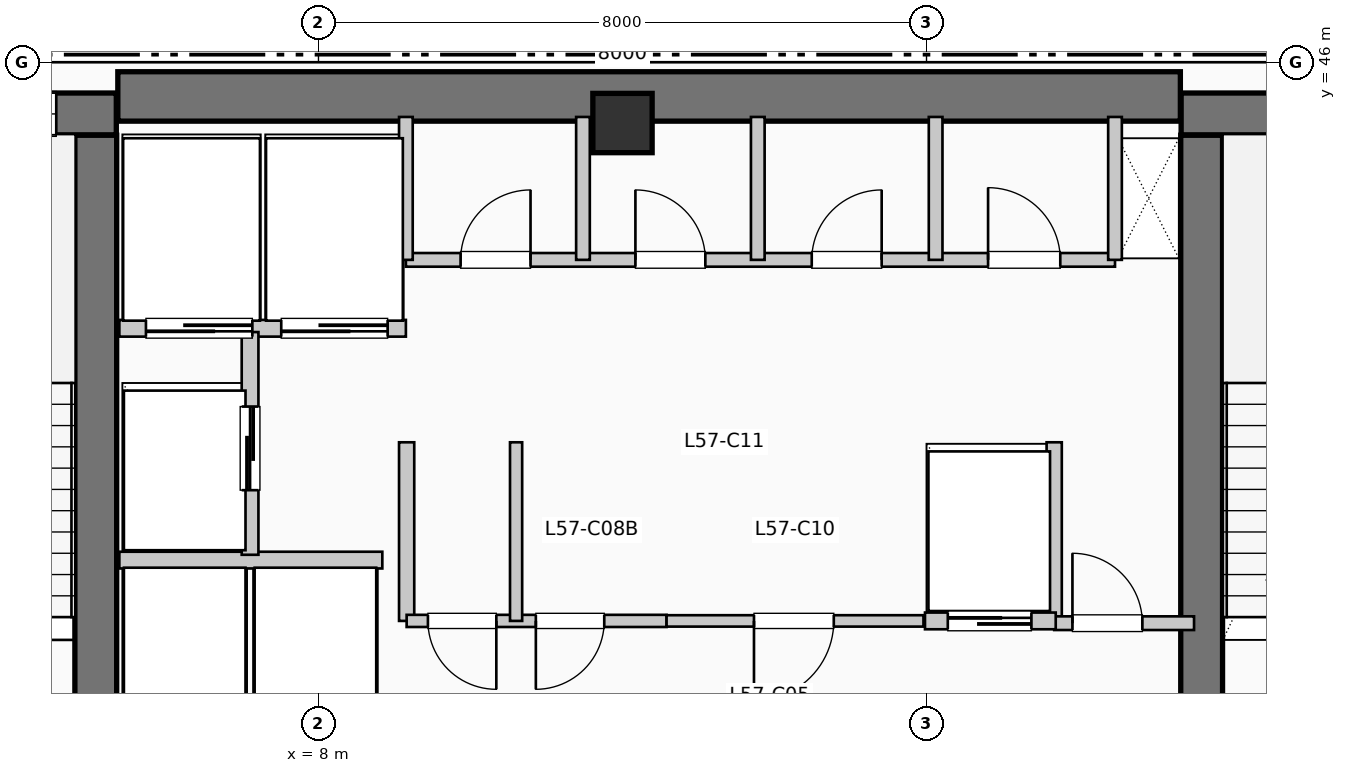
"""IFC4 building model, lengths in metres.
Left out: names, types, materials, properties, quantities, classifications, styles, units other than length and angle.
Written with IfcOpenShell. Run it as: python <this file> out.ifc"""

import sys

from ifc_helpers import new_model, si_unit, direction, frame, frame_2d, origin, origin_2d, place, context, subcontext, project, spatial, rectangle, extrude, element, fill, save


model = new_model("IFC4")
c1 = context("Model", 3, precision=1e-05, world=origin(), true_north=direction((0.0, 1.0)))
c2 = subcontext(c1, "Body", "Model", "MODEL_VIEW")
j1 = project(units=[si_unit("LENGTHUNIT", "METRE"), si_unit("PLANEANGLEUNIT", "RADIAN")], contexts=[c1])
p1 = place(None, origin())
s1 = spatial("IfcSite", under=j1, at=p1, CompositionType="ELEMENT")
p2 = place(p1, origin())
s2 = spatial("IfcBuilding", under=s1, at=p2, CompositionType="ELEMENT")
p3 = place(p2, frame((0.0, 0.0, 235.62)))
s3 = spatial("IfcBuildingStorey", under=s2, at=p3, CompositionType="ELEMENT", Elevation=235.62)
p4 = place(p3, frame((5.36, 45.55, 0.0), z_axis=(0.0, 0.0, 1.0), x_axis=(1.0, 0.0, 0.0)))
e1 = element("IfcWall", 1, at=p4, inside=s3, PredefinedType="SHEAR", context=c2, shape_type="SweptSolid", body=[
    extrude(rectangle(XDim=13.98, YDim=0.65, at=frame_2d((6.99, 0.0))), origin(), (0.0, 0.0, 1.0), 3.96),
])
p5 = place(p3, frame((5.07, 37.15, 0.0), z_axis=(0.0, 0.0, 1.0), x_axis=(0.0, 1.0, 0.0)))
e2 = element("IfcWall", 2, at=p5, inside=s3, PredefinedType="SHEAR", context=c2, shape_type="SweptSolid", body=[
    extrude(rectangle(XDim=7.89, YDim=0.55, at=frame_2d((3.945, 0.0))), origin(), (0.0, 0.0, 1.0), 3.96),
])
p6 = place(p3, frame((1.1, 45.32, 0.0), z_axis=(0.0, 0.0, 1.0), x_axis=(1.0, 0.0, 0.0)))
e3 = element("IfcWall", 3, at=p6, inside=s3, PredefinedType="SHEAR", context=c2, shape_type="SweptSolid", body=[
    extrude(rectangle(XDim=4.24, YDim=0.55, at=frame_2d((2.12, 0.0))), origin(), (0.0, 0.0, 1.0), 3.96),
])
p7 = place(p6, frame((2.05, 0.0, 1.05)))
e4 = element("IfcOpeningElement", 4, at=p7, cuts=e3, PredefinedType="OPENING", context=c2, shape_type="SweptSolid", body=[
    extrude(rectangle(XDim=1.4, YDim=1.8, at=frame_2d((0.7, 0.9))), frame((0.0, 0.285, 0.0), z_axis=(0.0, -1.0, 0.0), x_axis=(1.0, 0.0, 0.0)), (0.0, 0.0, 1.0), 0.57),
])
p8 = place(p3, frame((19.62, 37.15, 0.0), z_axis=(0.0, 0.0, 1.0), x_axis=(0.0, 1.0, 0.0)))
e5 = element("IfcWall", 5, at=p8, inside=s3, PredefinedType="SHEAR", context=c2, shape_type="SweptSolid", body=[
    extrude(rectangle(XDim=7.89, YDim=0.55, at=frame_2d((3.945, 0.0))), origin(), (0.0, 0.0, 1.0), 3.96),
])
p9 = place(p3, frame((19.35, 45.32, 0.0), z_axis=(0.0, 0.0, 1.0), x_axis=(1.0, 0.0, 0.0)))
e6 = element("IfcWall", 6, at=p9, inside=s3, PredefinedType="SHEAR", context=c2, shape_type="SweptSolid", body=[
    extrude(rectangle(XDim=3.69, YDim=0.55, at=frame_2d((1.845, 0.0))), origin(), (0.0, 0.0, 1.0), 3.96),
])
p10 = place(p9, frame((1.15, 0.0, 1.05)))
e7 = element("IfcOpeningElement", 7, at=p10, cuts=e6, PredefinedType="OPENING", context=c2, shape_type="SweptSolid", body=[
    extrude(rectangle(XDim=1.4, YDim=1.8, at=frame_2d((0.7, 0.9))), frame((0.0, 0.285, 0.0), z_axis=(0.0, -1.0, 0.0), x_axis=(1.0, 0.0, 0.0)), (0.0, 0.0, 1.0), 0.57),
])
p11 = place(p3, frame((12.0, 45.2, 0.0), z_axis=(0.0, 0.0, 1.0), x_axis=(1.0, 0.0, 0.0)))
e8 = element("IfcColumn", 8, at=p11, inside=s3, PredefinedType="COLUMN", context=c2, shape_type="SweptSolid", body=[
    extrude(rectangle(XDim=0.78, YDim=0.78, at=origin_2d()), origin(), (0.0, 0.0, 1.0), 3.96),
])
p12 = place(p3, frame((5.38, 39.45, 0.0), z_axis=(0.0, 0.0, 1.0), x_axis=(1.0, 0.0, 0.0)))
e9 = element("IfcWall", 9, at=p12, inside=s3, PredefinedType="PARTITIONING", context=c2, shape_type="SweptSolid", body=[
    extrude(rectangle(XDim=3.46, YDim=0.22, at=frame_2d((1.73, 0.0))), origin(), (0.0, 0.0, 1.0), 3.71),
])
p13 = place(p3, frame((5.38, 42.5, 0.0), z_axis=(0.0, 0.0, 1.0), x_axis=(1.0, 0.0, 0.0)))
e10 = element("IfcWall", 10, at=p13, inside=s3, PredefinedType="PARTITIONING", context=c2, shape_type="SweptSolid", body=[
    extrude(rectangle(XDim=3.77, YDim=0.22, at=frame_2d((1.885, 0.0))), origin(), (0.0, 0.0, 1.0), 3.71),
])
p14 = place(p13, frame((1.75, 0.0, 0.0), z_axis=(0.0, 0.0, 1.0), x_axis=(-1.0, 0.0, 0.0)))
e11 = element("IfcOpeningElement", 11, at=p14, cuts=e10, PredefinedType="OPENING", context=c2, shape_type="SweptSolid", body=[
    extrude(rectangle(XDim=1.4, YDim=2.2, at=frame_2d((0.7, 1.1))), frame((0.0, 0.12, 0.0), z_axis=(0.0, -1.0, 0.0), x_axis=(1.0, 0.0, 0.0)), (0.0, 0.0, 1.0), 0.24),
])
p15 = place(p13, frame((3.53, 0.0, 0.0), z_axis=(0.0, 0.0, 1.0), x_axis=(-1.0, 0.0, 0.0)))
e12 = element("IfcOpeningElement", 12, at=p15, cuts=e10, PredefinedType="OPENING", context=c2, shape_type="SweptSolid", body=[
    extrude(rectangle(XDim=1.4, YDim=2.2, at=frame_2d((0.7, 1.1))), frame((0.0, 0.12, 0.0), z_axis=(0.0, -1.0, 0.0), x_axis=(1.0, 0.0, 0.0)), (0.0, 0.0, 1.0), 0.24),
])
p16 = place(p3, frame((7.1, 39.52, 0.0), z_axis=(0.0, 0.0, 1.0), x_axis=(0.0, 1.0, 0.0)))
e13 = element("IfcWall", 13, at=p16, inside=s3, PredefinedType="PARTITIONING", context=c2, shape_type="SweptSolid", body=[
    extrude(rectangle(XDim=2.93, YDim=0.22, at=frame_2d((1.465, 0.0))), origin(), (0.0, 0.0, 1.0), 3.71),
])
p17 = place(p16, frame((0.85, 0.0, 0.0)))
e14 = element("IfcOpeningElement", 14, at=p17, cuts=e13, PredefinedType="OPENING", context=c2, shape_type="SweptSolid", body=[
    extrude(rectangle(XDim=1.1, YDim=2.2, at=frame_2d((0.55, 1.1))), frame((0.0, 0.12, 0.0), z_axis=(0.0, -1.0, 0.0), x_axis=(1.0, 0.0, 0.0)), (0.0, 0.0, 1.0), 0.24),
])
for number, where, z_axis, x_axis in (
    (15, (9.16, 38.65, 0.0), (0.0, 0.0, 1.0), (0.0, 1.0, 0.0)),
    (16, (17.68, 38.65, 0.0), (0.0, 0.0, 1.0), (0.0, 1.0, 0.0)),
):
    element("IfcWall", number, at=place(p3, frame(where, z_axis=z_axis, x_axis=x_axis)), inside=s3, PredefinedType="PARTITIONING", context=c2, shape_type="SweptSolid", body=[
        extrude(rectangle(XDim=2.35, YDim=0.2, at=frame_2d((1.175, 0.0))), origin(), (0.0, 0.0, 1.0), 3.71),
    ])
p18 = place(p3, frame((17.68, 38.62, 0.0), z_axis=(0.0, 0.0, 1.0), x_axis=(1.0, 0.0, 0.0)))
e17 = element("IfcWall", 17, at=p18, inside=s3, PredefinedType="PARTITIONING", context=c2, shape_type="SweptSolid", body=[
    extrude(rectangle(XDim=1.84, YDim=0.18, at=frame_2d((0.92, 0.0))), origin(), (0.0, 0.0, 1.0), 3.71),
])
p19 = place(p18, frame((0.24, 0.0, 0.0)))
e18 = element("IfcOpeningElement", 18, at=p19, cuts=e17, PredefinedType="OPENING", context=c2, shape_type="SweptSolid", body=[
    extrude(rectangle(XDim=0.92, YDim=2.1, at=frame_2d((0.46, 1.05))), frame((0.0, 0.1, 0.0), z_axis=(0.0, -1.0, 0.0), x_axis=(1.0, 0.0, 0.0)), (0.0, 0.0, 1.0), 0.2),
])
p20 = place(p3, frame((9.16, 38.65, 0.0), z_axis=(0.0, 0.0, 1.0), x_axis=(1.0, 0.0, 0.0)))
e19 = element("IfcWall", 19, at=p20, inside=s3, PredefinedType="PARTITIONING", context=c2, shape_type="SweptSolid", body=[
    extrude(rectangle(XDim=3.42, YDim=0.16, at=frame_2d((1.71, 0.0))), origin(), (0.0, 0.0, 1.0), 3.71),
])
p21 = place(p20, frame((1.18, 0.0, 0.0), z_axis=(0.0, 0.0, 1.0), x_axis=(-1.0, 0.0, 0.0)))
e20 = element("IfcOpeningElement", 20, at=p21, cuts=e19, PredefinedType="OPENING", context=c2, shape_type="SweptSolid", body=[
    extrude(rectangle(XDim=0.9, YDim=2.15, at=frame_2d((0.45, 1.075))), frame((0.0, 0.09, 0.0), z_axis=(0.0, -1.0, 0.0), x_axis=(1.0, 0.0, 0.0)), (0.0, 0.0, 1.0), 0.18),
])
p22 = place(p20, frame((2.6, 0.0, 0.0), z_axis=(0.0, 0.0, 1.0), x_axis=(-1.0, 0.0, 0.0)))
e21 = element("IfcOpeningElement", 21, at=p22, cuts=e19, PredefinedType="OPENING", context=c2, shape_type="SweptSolid", body=[
    extrude(rectangle(XDim=0.9, YDim=2.15, at=frame_2d((0.45, 1.075))), frame((0.0, 0.09, 0.0), z_axis=(0.0, -1.0, 0.0), x_axis=(1.0, 0.0, 0.0)), (0.0, 0.0, 1.0), 0.18),
])
p23 = place(p3, frame((10.6, 38.65, 0.0), z_axis=(0.0, 0.0, 1.0), x_axis=(0.0, 1.0, 0.0)))
e22 = element("IfcWall", 22, at=p23, inside=s3, PredefinedType="PARTITIONING", context=c2, shape_type="SweptSolid", body=[
    extrude(rectangle(XDim=2.35, YDim=0.16, at=frame_2d((1.175, 0.0))), origin(), (0.0, 0.0, 1.0), 3.71),
])
p24 = place(p3, frame((12.58, 38.65, 0.0), z_axis=(0.0, 0.0, 1.0), x_axis=(1.0, 0.0, 0.0)))
e23 = element("IfcWall", 23, at=p24, inside=s3, PredefinedType="PARTITIONING", context=c2, shape_type="SweptSolid", body=[
    extrude(rectangle(XDim=3.38, YDim=0.15, at=frame_2d((1.69, 0.0))), origin(), (0.0, 0.0, 1.0), 3.71),
])
p25 = place(p24, frame((2.2, 0.0, 0.0), z_axis=(0.0, 0.0, 1.0), x_axis=(-1.0, 0.0, 0.0)))
e24 = element("IfcOpeningElement", 24, at=p25, cuts=e23, PredefinedType="OPENING", context=c2, shape_type="SweptSolid", body=[
    extrude(rectangle(XDim=1.05, YDim=2.15, at=frame_2d((0.525, 1.075))), frame((0.0, 0.085, 0.0), z_axis=(0.0, -1.0, 0.0), x_axis=(1.0, 0.0, 0.0)), (0.0, 0.0, 1.0), 0.17),
])
p26 = place(p3, frame((15.98, 38.65, 0.0), z_axis=(0.0, 0.0, 1.0), x_axis=(1.0, 0.0, 0.0)))
e25 = element("IfcWall", 25, at=p26, inside=s3, PredefinedType="PARTITIONING", context=c2, shape_type="SweptSolid", body=[
    extrude(rectangle(XDim=1.72, YDim=0.22, at=frame_2d((0.86, 0.0))), origin(), (0.0, 0.0, 1.0), 3.71),
])
p27 = place(p26, frame((0.3, 0.0, 0.0)))
e26 = element("IfcOpeningElement", 26, at=p27, cuts=e25, PredefinedType="OPENING", context=c2, shape_type="SweptSolid", body=[
    extrude(rectangle(XDim=1.1, YDim=2.2, at=frame_2d((0.55, 1.1))), frame((0.0, 0.12, 0.0), z_axis=(0.0, -1.0, 0.0), x_axis=(1.0, 0.0, 0.0)), (0.0, 0.0, 1.0), 0.24),
])
p28 = place(p3, frame((9.15, 43.4, 0.0), z_axis=(0.0, 0.0, 1.0), x_axis=(1.0, 0.0, 0.0)))
e27 = element("IfcWall", 27, at=p28, inside=s3, PredefinedType="PLUMBINGWALL", context=c2, shape_type="SweptSolid", body=[
    extrude(rectangle(XDim=9.33, YDim=0.18, at=frame_2d((4.665, 0.0))), origin(), (0.0, 0.0, 1.0), 3.71),
])
p29 = place(p28, frame((0.72, 0.0, 0.0)))
e28 = element("IfcOpeningElement", 28, at=p29, cuts=e27, PredefinedType="OPENING", context=c2, shape_type="SweptSolid", body=[
    extrude(rectangle(XDim=0.92, YDim=2.1, at=frame_2d((0.46, 1.05))), frame((0.0, 0.1, 0.0), z_axis=(0.0, -1.0, 0.0), x_axis=(1.0, 0.0, 0.0)), (0.0, 0.0, 1.0), 0.2),
])
p30 = place(p28, frame((3.02, 0.0, 0.0)))
e29 = element("IfcOpeningElement", 29, at=p30, cuts=e27, PredefinedType="OPENING", context=c2, shape_type="SweptSolid", body=[
    extrude(rectangle(XDim=0.92, YDim=2.1, at=frame_2d((0.46, 1.05))), frame((0.0, 0.1, 0.0), z_axis=(0.0, -1.0, 0.0), x_axis=(1.0, 0.0, 0.0)), (0.0, 0.0, 1.0), 0.2),
])
p31 = place(p28, frame((5.34, 0.0, 0.0)))
e30 = element("IfcOpeningElement", 30, at=p31, cuts=e27, PredefinedType="OPENING", context=c2, shape_type="SweptSolid", body=[
    extrude(rectangle(XDim=0.92, YDim=2.1, at=frame_2d((0.46, 1.05))), frame((0.0, 0.1, 0.0), z_axis=(0.0, -1.0, 0.0), x_axis=(1.0, 0.0, 0.0)), (0.0, 0.0, 1.0), 0.2),
])
p32 = place(p28, frame((7.66, 0.0, 0.0)))
e31 = element("IfcOpeningElement", 31, at=p32, cuts=e27, PredefinedType="OPENING", context=c2, shape_type="SweptSolid", body=[
    extrude(rectangle(XDim=0.95, YDim=2.1, at=frame_2d((0.475, 1.05))), frame((0.0, 0.1, 0.0), z_axis=(0.0, -1.0, 0.0), x_axis=(1.0, 0.0, 0.0)), (0.0, 0.0, 1.0), 0.2),
])
for number, where, z_axis, x_axis in (
    (32, (9.15, 43.4, 0.0), (0.0, 0.0, 1.0), (0.0, 1.0, 0.0)),
    (33, (18.48, 43.4, 0.0), (0.0, 0.0, 1.0), (0.0, 1.0, 0.0)),
    (34, (11.48, 43.4, 0.0), (0.0, 0.0, 1.0), (0.0, 1.0, 0.0)),
    (35, (13.78, 43.4, 0.0), (0.0, 0.0, 1.0), (0.0, 1.0, 0.0)),
    (36, (16.12, 43.4, 0.0), (0.0, 0.0, 1.0), (0.0, 1.0, 0.0)),
):
    element("IfcWall", number, at=place(p3, frame(where, z_axis=z_axis, x_axis=x_axis)), inside=s3, PredefinedType="PLUMBINGWALL", context=c2, shape_type="SweptSolid", body=[
        extrude(rectangle(XDim=1.88, YDim=0.18, at=frame_2d((0.94, 0.0))), origin(), (0.0, 0.0, 1.0), 3.71),
    ])
p33 = place(p7, origin())
e37 = element("IfcWindow", 37, at=p33, inside=s3, PartitioningType="SINGLE_PANEL", PredefinedType="WINDOW", context=c2, shape_type="SweptSolid", body=[
    extrude(rectangle(XDim=1.4, YDim=1.8, at=frame_2d((0.7, 0.9))), frame((0.0, 0.03, 0.0), z_axis=(0.0, -1.0, 0.0), x_axis=(1.0, 0.0, 0.0)), (0.0, 0.0, 1.0), 0.06),
])
fill(e4, e37)
p34 = place(p14, origin())
e38 = element("IfcDoor", 38, at=p34, inside=s3, OperationType="SLIDING_TO_LEFT", PredefinedType="DOOR", context=c2, shape_type="SweptSolid", body=[
    extrude(rectangle(XDim=1.4, YDim=2.2, at=frame_2d((0.7, 1.1))), frame((0.0, 0.025, 0.0), z_axis=(0.0, -1.0, 0.0), x_axis=(1.0, 0.0, 0.0)), (0.0, 0.0, 1.0), 0.05),
])
fill(e11, e38)
p35 = place(p15, origin())
e39 = element("IfcDoor", 39, at=p35, inside=s3, OperationType="SLIDING_TO_LEFT", PredefinedType="DOOR", context=c2, shape_type="SweptSolid", body=[
    extrude(rectangle(XDim=1.4, YDim=2.2, at=frame_2d((0.7, 1.1))), frame((0.0, 0.025, 0.0), z_axis=(0.0, -1.0, 0.0), x_axis=(1.0, 0.0, 0.0)), (0.0, 0.0, 1.0), 0.05),
])
fill(e12, e39)
p36 = place(p17, origin())
e40 = element("IfcDoor", 40, at=p36, inside=s3, OperationType="SLIDING_TO_LEFT", PredefinedType="DOOR", context=c2, shape_type="SweptSolid", body=[
    extrude(rectangle(XDim=1.1, YDim=2.2, at=frame_2d((0.55, 1.1))), frame((0.0, 0.025, 0.0), z_axis=(0.0, -1.0, 0.0), x_axis=(1.0, 0.0, 0.0)), (0.0, 0.0, 1.0), 0.05),
])
fill(e14, e40)
p37 = place(p19, origin())
e41 = element("IfcDoor", 41, at=p37, inside=s3, OperationType="SINGLE_SWING_LEFT", PredefinedType="DOOR", context=c2, shape_type="SweptSolid", body=[
    extrude(rectangle(XDim=0.92, YDim=2.1, at=frame_2d((0.46, 1.05))), frame((0.0, 0.025, 0.0), z_axis=(0.0, -1.0, 0.0), x_axis=(1.0, 0.0, 0.0)), (0.0, 0.0, 1.0), 0.05),
])
fill(e18, e41)
p38 = place(p21, origin())
e42 = element("IfcDoor", 42, at=p38, inside=s3, OperationType="SINGLE_SWING_RIGHT", PredefinedType="DOOR", context=c2, shape_type="SweptSolid", body=[
    extrude(rectangle(XDim=0.9, YDim=2.15, at=frame_2d((0.45, 1.075))), frame((0.0, 0.025, 0.0), z_axis=(0.0, -1.0, 0.0), x_axis=(1.0, 0.0, 0.0)), (0.0, 0.0, 1.0), 0.05),
])
fill(e20, e42)
p39 = place(p22, origin())
e43 = element("IfcDoor", 43, at=p39, inside=s3, OperationType="SINGLE_SWING_LEFT", PredefinedType="DOOR", context=c2, shape_type="SweptSolid", body=[
    extrude(rectangle(XDim=0.9, YDim=2.15, at=frame_2d((0.45, 1.075))), frame((0.0, 0.025, 0.0), z_axis=(0.0, -1.0, 0.0), x_axis=(1.0, 0.0, 0.0)), (0.0, 0.0, 1.0), 0.05),
])
fill(e21, e43)
p40 = place(p25, origin())
e44 = element("IfcDoor", 44, at=p40, inside=s3, OperationType="SINGLE_SWING_LEFT", PredefinedType="DOOR", context=c2, shape_type="SweptSolid", body=[
    extrude(rectangle(XDim=1.05, YDim=2.15, at=frame_2d((0.525, 1.075))), frame((0.0, 0.025, 0.0), z_axis=(0.0, -1.0, 0.0), x_axis=(1.0, 0.0, 0.0)), (0.0, 0.0, 1.0), 0.05),
])
fill(e24, e44)
p41 = place(p27, origin())
e45 = element("IfcDoor", 45, at=p41, inside=s3, OperationType="SLIDING_TO_LEFT", PredefinedType="DOOR", context=c2, shape_type="SweptSolid", body=[
    extrude(rectangle(XDim=1.1, YDim=2.2, at=frame_2d((0.55, 1.1))), frame((0.0, 0.025, 0.0), z_axis=(0.0, -1.0, 0.0), x_axis=(1.0, 0.0, 0.0)), (0.0, 0.0, 1.0), 0.05),
])
fill(e26, e45)
p42 = place(p29, origin())
e46 = element("IfcDoor", 46, at=p42, inside=s3, OperationType="SINGLE_SWING_RIGHT", PredefinedType="DOOR", context=c2, shape_type="SweptSolid", body=[
    extrude(rectangle(XDim=0.92, YDim=2.1, at=frame_2d((0.46, 1.05))), frame((0.0, 0.025, 0.0), z_axis=(0.0, -1.0, 0.0), x_axis=(1.0, 0.0, 0.0)), (0.0, 0.0, 1.0), 0.05),
])
fill(e28, e46)
p43 = place(p30, origin())
e47 = element("IfcDoor", 47, at=p43, inside=s3, OperationType="SINGLE_SWING_LEFT", PredefinedType="DOOR", context=c2, shape_type="SweptSolid", body=[
    extrude(rectangle(XDim=0.92, YDim=2.1, at=frame_2d((0.46, 1.05))), frame((0.0, 0.025, 0.0), z_axis=(0.0, -1.0, 0.0), x_axis=(1.0, 0.0, 0.0)), (0.0, 0.0, 1.0), 0.05),
])
fill(e29, e47)
p44 = place(p31, origin())
e48 = element("IfcDoor", 48, at=p44, inside=s3, OperationType="SINGLE_SWING_RIGHT", PredefinedType="DOOR", context=c2, shape_type="SweptSolid", body=[
    extrude(rectangle(XDim=0.92, YDim=2.1, at=frame_2d((0.46, 1.05))), frame((0.0, 0.025, 0.0), z_axis=(0.0, -1.0, 0.0), x_axis=(1.0, 0.0, 0.0)), (0.0, 0.0, 1.0), 0.05),
])
fill(e30, e48)
p45 = place(p32, origin())
e49 = element("IfcDoor", 49, at=p45, inside=s3, OperationType="SINGLE_SWING_LEFT", PredefinedType="DOOR", context=c2, shape_type="SweptSolid", body=[
    extrude(rectangle(XDim=0.95, YDim=2.1, at=frame_2d((0.475, 1.05))), frame((0.0, 0.025, 0.0), z_axis=(0.0, -1.0, 0.0), x_axis=(1.0, 0.0, 0.0)), (0.0, 0.0, 1.0), 0.05),
])
fill(e31, e49)
save(model, sys.argv[1])
